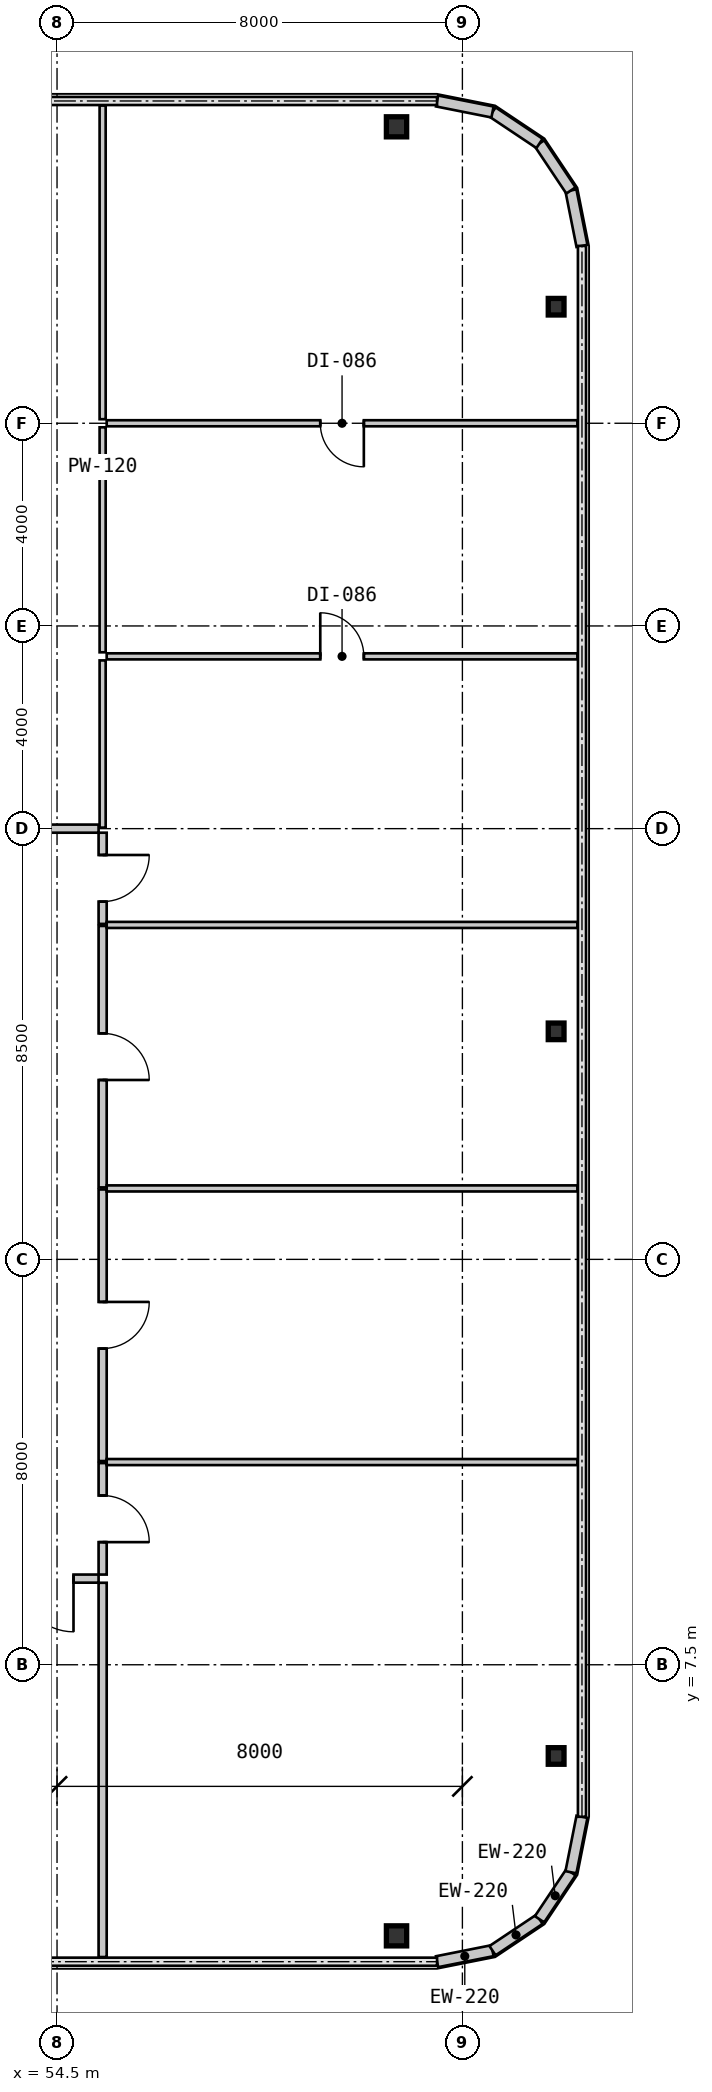
"""IFC4 building model, lengths in metres.
Left out: names, types, materials, properties, quantities, classifications, styles, units other than length and angle.
Written with IfcOpenShell. Run it as: python <this file> out.ifc"""

import sys

from ifc_helpers import new_model, si_unit, direction, frame, frame_2d, origin, origin_2d, place, context, subcontext, project, spatial, rectangle, i_section, extrude, source, transform, mapped, element, fill, save


model = new_model("IFC4")
c1 = context("Model", 3, precision=1e-05, world=origin(), true_north=direction((0.0, 1.0)))
c2 = subcontext(c1, "Body", "Model", "MODEL_VIEW")
j1 = project(units=[si_unit("LENGTHUNIT", "METRE"), si_unit("PLANEANGLEUNIT", "RADIAN")], contexts=[c1])
p1 = place(None, origin())
s1 = spatial("IfcSite", under=j1, at=p1, CompositionType="ELEMENT")
p2 = place(p1, origin())
s2 = spatial("IfcBuilding", under=s1, at=p2, CompositionType="ELEMENT")
p3 = place(p2, frame((0.0, 0.0, 51.45)))
s3 = spatial("IfcBuildingStorey", under=s2, at=p3, CompositionType="ELEMENT", Elevation=51.45)
m1 = source(origin(), c2, "Body", "SweptSolid", [
    extrude(i_section(OverallWidth=0.4, OverallDepth=0.396, WebThickness=0.022, FlangeThickness=0.034, at=origin_2d()), origin(), (0.0, 0.0, 1.0), 3.15),
])
for number, where, z_axis, x_axis in (
    (1, (61.2, 2.15, 0.0), (0.0, 0.0, 1.0), (1.0, 0.0, 0.0)),
    (2, (61.2, 37.85, 0.0), (0.0, 0.0, 1.0), (1.0, 0.0, 0.0)),
):
    element("IfcColumn", number, at=place(p3, frame(where, z_axis=z_axis, x_axis=x_axis)), inside=s3, PredefinedType="COLUMN", context=c2, shape_type="MappedRepresentation", body=[
        mapped(m1, transform((0.0, 0.0, 0.0), scale=1.0)),
    ])
m2 = source(origin(), c2, "Body", "SweptSolid", [
    extrude(i_section(OverallWidth=0.311, OverallDepth=0.327, WebThickness=0.016, FlangeThickness=0.025, at=origin_2d()), origin(), (0.0, 0.0, 1.0), 3.15),
])
for number, where, z_axis, x_axis in (
    (3, (64.35, 5.7, 0.0), (0.0, 0.0, 1.0), (1.0, 0.0, 0.0)),
    (4, (64.35, 20.0, 0.0), (0.0, 0.0, 1.0), (1.0, 0.0, 0.0)),
    (5, (64.35, 34.3, 0.0), (0.0, 0.0, 1.0), (1.0, 0.0, 0.0)),
):
    element("IfcColumn", number, at=place(p3, frame(where, z_axis=z_axis, x_axis=x_axis)), inside=s3, PredefinedType="COLUMN", context=c2, shape_type="MappedRepresentation", body=[
        mapped(m2, transform((0.0, 0.0, 0.0), scale=1.0)),
    ])
m3 = source(origin(), c2, "Body", "SweptSolid", [
    extrude(rectangle(XDim=1.116, YDim=0.22, at=frame_2d((0.558, 0.0))), origin(), (0.0, 0.0, 1.0), 2.93),
])
for number, where, z_axis, x_axis in (
    (6, (62.0, 1.64, 0.0), (0.0, 0.0, 1.0), (0.981, 0.195, 0.0)),
    (7, (63.094, 1.858, 0.0), (0.0, 0.0, 1.0), (0.831, 0.556, 0.0)),
    (8, (64.022, 2.478, 0.0), (0.0, 0.0, 1.0), (0.556, 0.831, 0.0)),
    (9, (64.642, 3.406, 0.0), (0.0, 0.0, 1.0), (0.195, 0.981, 0.0)),
    (10, (64.86, 35.5, 0.0), (0.0, 0.0, 1.0), (-0.195, 0.981, 0.0)),
    (11, (64.642, 36.594, 0.0), (0.0, 0.0, 1.0), (-0.556, 0.831, 0.0)),
    (12, (64.022, 37.522, 0.0), (0.0, 0.0, 1.0), (-0.831, 0.556, 0.0)),
    (13, (63.094, 38.142, 0.0), (0.0, 0.0, 1.0), (-0.981, 0.195, 0.0)),
):
    element("IfcWall", number, at=place(p3, frame(where, z_axis=z_axis, x_axis=x_axis)), inside=s3, PredefinedType="SOLIDWALL", context=c2, shape_type="MappedRepresentation", body=[
        mapped(m3, transform((0.0, 0.0, 0.0), scale=1.0)),
    ])
m4 = source(origin(), c2, "Body", "SweptSolid", [
    extrude(rectangle(XDim=2.04, YDim=0.16, at=frame_2d((1.02, 0.0))), origin(), (0.0, 0.0, 1.0), 2.93),
])
p4 = place(p3, frame((55.32, 9.2, 0.0), z_axis=(0.0, 0.0, 1.0), x_axis=(-1.0, 0.0, 0.0)))
e14 = element("IfcWall", 14, at=p4, inside=s3, PredefinedType="PARTITIONING", context=c2, shape_type="MappedRepresentation", body=[
    mapped(m4, transform((0.0, 0.0, 0.0), scale=1.0)),
])
m5 = source(origin(), c2, "Body", "SweptSolid", [
    extrude(rectangle(XDim=1.05, YDim=2.1, at=frame_2d((0.525, 1.05))), frame((0.0, 0.09, 0.0), z_axis=(0.0, -1.0, 0.0), x_axis=(1.0, 0.0, 0.0)), (0.0, 0.0, 1.0), 0.18),
])
p5 = place(p4, frame((0.495, 0.0, 0.0)))
e15 = element("IfcOpeningElement", 15, at=p5, cuts=e14, PredefinedType="OPENING", context=c2, shape_type="MappedRepresentation", body=[
    mapped(m5, transform((0.0, 0.0, 0.0), scale=1.0)),
])
m6 = source(origin(), c2, "Body", "SweptSolid", [
    extrude(rectangle(XDim=2.2, YDim=0.16, at=frame_2d((1.1, 0.0))), origin(), (0.0, 0.0, 1.0), 2.93),
])
p6 = place(p3, frame((55.4, 11.48, 0.0), z_axis=(0.0, 0.0, 1.0), x_axis=(0.0, -1.0, 0.0)))
e16 = element("IfcWall", 16, at=p6, inside=s3, PredefinedType="PARTITIONING", context=c2, shape_type="MappedRepresentation", body=[
    mapped(m6, transform((0.0, 0.0, 0.0), scale=1.0)),
])
m7 = source(origin(), c2, "Body", "SweptSolid", [
    extrude(rectangle(XDim=0.92, YDim=2.1, at=frame_2d((0.46, 1.05))), frame((0.0, 0.09, 0.0), z_axis=(0.0, -1.0, 0.0), x_axis=(1.0, 0.0, 0.0)), (0.0, 0.0, 1.0), 0.18),
])
p7 = place(p6, frame((0.64, 0.0, 0.0)))
e17 = element("IfcOpeningElement", 17, at=p7, cuts=e16, PredefinedType="OPENING", context=c2, shape_type="MappedRepresentation", body=[
    mapped(m7, transform((0.0, 0.0, 0.0), scale=1.0)),
])
m8 = source(origin(), c2, "Body", "SweptSolid", [
    extrude(rectangle(XDim=5.36, YDim=0.16, at=frame_2d((2.68, 0.0))), origin(), (0.0, 0.0, 1.0), 2.93),
])
p8 = place(p3, frame((55.4, 16.88, 0.0), z_axis=(0.0, 0.0, 1.0), x_axis=(0.0, -1.0, 0.0)))
e18 = element("IfcWall", 18, at=p8, inside=s3, PredefinedType="PARTITIONING", context=c2, shape_type="MappedRepresentation", body=[
    mapped(m8, transform((0.0, 0.0, 0.0), scale=1.0)),
])
p9 = place(p8, frame((2.22, 0.0, 0.0)))
e19 = element("IfcOpeningElement", 19, at=p9, cuts=e18, PredefinedType="OPENING", context=c2, shape_type="MappedRepresentation", body=[
    mapped(m7, transform((0.0, 0.0, 0.0), scale=1.0)),
])
m9 = source(origin(), c2, "Body", "SweptSolid", [
    extrude(rectangle(XDim=5.16, YDim=0.16, at=frame_2d((2.58, 0.0))), origin(), (0.0, 0.0, 1.0), 2.93),
])
p10 = place(p3, frame((55.4, 22.08, 0.0), z_axis=(0.0, 0.0, 1.0), x_axis=(0.0, -1.0, 0.0)))
e20 = element("IfcWall", 20, at=p10, inside=s3, PredefinedType="PARTITIONING", context=c2, shape_type="MappedRepresentation", body=[
    mapped(m9, transform((0.0, 0.0, 0.0), scale=1.0)),
])
p11 = place(p10, frame((2.12, 0.0, 0.0)))
e21 = element("IfcOpeningElement", 21, at=p11, cuts=e20, PredefinedType="OPENING", context=c2, shape_type="MappedRepresentation", body=[
    mapped(m7, transform((0.0, 0.0, 0.0), scale=1.0)),
])
m10 = source(origin(), c2, "Body", "SweptSolid", [
    extrude(rectangle(XDim=1.8, YDim=0.16, at=frame_2d((0.9, 0.0))), origin(), (0.0, 0.0, 1.0), 2.93),
])
p12 = place(p3, frame((55.4, 23.92, 0.0), z_axis=(0.0, 0.0, 1.0), x_axis=(0.0, -1.0, 0.0)))
e22 = element("IfcWall", 22, at=p12, inside=s3, PredefinedType="PARTITIONING", context=c2, shape_type="MappedRepresentation", body=[
    mapped(m10, transform((0.0, 0.0, 0.0), scale=1.0)),
])
p13 = place(p12, frame((0.44, 0.0, 0.0)))
e23 = element("IfcOpeningElement", 23, at=p13, cuts=e22, PredefinedType="OPENING", context=c2, shape_type="MappedRepresentation", body=[
    mapped(m7, transform((0.0, 0.0, 0.0), scale=1.0)),
])
m11 = source(origin(), c2, "Body", "SweptSolid", [
    extrude(rectangle(XDim=4.13, YDim=0.16, at=frame_2d((2.065, 0.0))), origin(), (0.0, 0.0, 1.0), 2.93),
])
p14 = place(p3, frame((51.19, 24.0, 0.0), z_axis=(0.0, 0.0, 1.0), x_axis=(1.0, 0.0, 0.0)))
e24 = element("IfcWall", 24, at=p14, inside=s3, PredefinedType="PARTITIONING", context=c2, shape_type="MappedRepresentation", body=[
    mapped(m11, transform((0.0, 0.0, 0.0), scale=1.0)),
])
m12 = source(origin(), c2, "Body", "SweptSolid", [
    extrude(rectangle(XDim=7.386, YDim=0.16, at=frame_2d((3.693, 0.0))), origin(), (0.0, 0.0, 1.0), 2.93),
])
p15 = place(p3, frame((55.4, 9.118, 0.0), z_axis=(0.0, 0.0, 1.0), x_axis=(0.0, -1.0, 0.0)))
e25 = element("IfcWall", 25, at=p15, inside=s3, PredefinedType="PARTITIONING", context=c2, shape_type="MappedRepresentation", body=[
    mapped(m12, transform((0.0, 0.0, 0.0), scale=1.0)),
])
m13 = source(origin(), c2, "Body", "SweptSolid", [
    extrude(rectangle(XDim=9.29, YDim=0.12, at=frame_2d((4.645, 0.0))), origin(), (0.0, 0.0, 1.0), 2.93),
])
for number, where, z_axis, x_axis in (
    (26, (55.48, 11.5, 0.0), (0.0, 0.0, 1.0), (1.0, 0.0, 0.0)),
    (27, (55.48, 16.9, 0.0), (0.0, 0.0, 1.0), (1.0, 0.0, 0.0)),
    (28, (55.48, 22.1, 0.0), (0.0, 0.0, 1.0), (1.0, 0.0, 0.0)),
):
    element("IfcWall", number, at=place(p3, frame(where, z_axis=z_axis, x_axis=x_axis)), inside=s3, PredefinedType="PARTITIONING", context=c2, shape_type="MappedRepresentation", body=[
        mapped(m13, transform((0.0, 0.0, 0.0), scale=1.0)),
    ])
p16 = place(p3, frame((55.48, 27.4, 0.0), z_axis=(0.0, 0.0, 1.0), x_axis=(1.0, 0.0, 0.0)))
e29 = element("IfcWall", 29, at=p16, inside=s3, PredefinedType="PARTITIONING", context=c2, shape_type="MappedRepresentation", body=[
    mapped(m13, transform((0.0, 0.0, 0.0), scale=1.0)),
])
m14 = source(origin(), c2, "Body", "SweptSolid", [
    extrude(rectangle(XDim=0.86, YDim=2.1, at=frame_2d((0.43, 1.05))), frame((0.0, 0.07, 0.0), z_axis=(0.0, -1.0, 0.0), x_axis=(1.0, 0.0, 0.0)), (0.0, 0.0, 1.0), 0.14),
])
p17 = place(p16, frame((4.215, 0.0, 0.0)))
e30 = element("IfcOpeningElement", 30, at=p17, cuts=e29, PredefinedType="OPENING", context=c2, shape_type="MappedRepresentation", body=[
    mapped(m14, transform((0.0, 0.0, 0.0), scale=1.0)),
])
m15 = source(origin(), c2, "Body", "SweptSolid", [
    extrude(rectangle(XDim=3.3, YDim=0.12, at=frame_2d((1.65, 0.0))), origin(), (0.0, 0.0, 1.0), 2.93),
])
p18 = place(p3, frame((55.4, 24.02, 0.0), z_axis=(0.0, 0.0, 1.0), x_axis=(0.0, 1.0, 0.0)))
e31 = element("IfcWall", 31, at=p18, inside=s3, PredefinedType="PARTITIONING", context=c2, shape_type="MappedRepresentation", body=[
    mapped(m15, transform((0.0, 0.0, 0.0), scale=1.0)),
])
p19 = place(p3, frame((55.48, 32.0, 0.0), z_axis=(0.0, 0.0, 1.0), x_axis=(1.0, 0.0, 0.0)))
e32 = element("IfcWall", 32, at=p19, inside=s3, PredefinedType="PARTITIONING", context=c2, shape_type="MappedRepresentation", body=[
    mapped(m13, transform((0.0, 0.0, 0.0), scale=1.0)),
])
p20 = place(p19, frame((4.215, 0.0, 0.0)))
e33 = element("IfcOpeningElement", 33, at=p20, cuts=e32, PredefinedType="OPENING", context=c2, shape_type="MappedRepresentation", body=[
    mapped(m14, transform((0.0, 0.0, 0.0), scale=1.0)),
])
m16 = source(origin(), c2, "Body", "SweptSolid", [
    extrude(rectangle(XDim=4.44, YDim=0.12, at=frame_2d((2.22, 0.0))), origin(), (0.0, 0.0, 1.0), 2.93),
])
p21 = place(p3, frame((55.4, 27.48, 0.0), z_axis=(0.0, 0.0, 1.0), x_axis=(0.0, 1.0, 0.0)))
e34 = element("IfcWall", 34, at=p21, inside=s3, PredefinedType="PARTITIONING", context=c2, shape_type="MappedRepresentation", body=[
    mapped(m16, transform((0.0, 0.0, 0.0), scale=1.0)),
])
m17 = source(origin(), c2, "Body", "SweptSolid", [
    extrude(rectangle(XDim=6.19, YDim=0.12, at=frame_2d((3.095, 0.0))), origin(), (0.0, 0.0, 1.0), 2.93),
])
p22 = place(p3, frame((55.4, 32.08, 0.0), z_axis=(0.0, 0.0, 1.0), x_axis=(0.0, 1.0, 0.0)))
e35 = element("IfcWall", 35, at=p22, inside=s3, PredefinedType="PARTITIONING", context=c2, shape_type="MappedRepresentation", body=[
    mapped(m17, transform((0.0, 0.0, 0.0), scale=1.0)),
])
m18 = source(origin(), c2, "Body", "SweptSolid", [
    extrude(rectangle(XDim=1.05, YDim=2.1, at=frame_2d((0.525, 1.05))), frame((0.0, 0.025, 0.0), z_axis=(0.0, -1.0, 0.0), x_axis=(1.0, 0.0, 0.0)), (0.0, 0.0, 1.0), 0.05),
])
p23 = place(p5, origin())
e36 = element("IfcDoor", 36, at=p23, inside=s3, OperationType="SINGLE_SWING_LEFT", PredefinedType="DOOR", context=c2, shape_type="MappedRepresentation", body=[
    mapped(m18, transform((0.0, 0.0, 0.0), scale=1.0)),
])
fill(e15, e36)
m19 = source(origin(), c2, "Body", "SweptSolid", [
    extrude(rectangle(XDim=0.92, YDim=2.1, at=frame_2d((0.46, 1.05))), frame((0.0, 0.025, 0.0), z_axis=(0.0, -1.0, 0.0), x_axis=(1.0, 0.0, 0.0)), (0.0, 0.0, 1.0), 0.05),
])
p24 = place(p7, origin())
e37 = element("IfcDoor", 37, at=p24, inside=s3, OperationType="SINGLE_SWING_RIGHT", PredefinedType="DOOR", context=c2, shape_type="MappedRepresentation", body=[
    mapped(m19, transform((0.0, 0.0, 0.0), scale=1.0)),
])
fill(e17, e37)
p25 = place(p9, origin())
e38 = element("IfcDoor", 38, at=p25, inside=s3, OperationType="SINGLE_SWING_LEFT", PredefinedType="DOOR", context=c2, shape_type="MappedRepresentation", body=[
    mapped(m19, transform((0.0, 0.0, 0.0), scale=1.0)),
])
fill(e19, e38)
p26 = place(p11, origin())
e39 = element("IfcDoor", 39, at=p26, inside=s3, OperationType="SINGLE_SWING_RIGHT", PredefinedType="DOOR", context=c2, shape_type="MappedRepresentation", body=[
    mapped(m19, transform((0.0, 0.0, 0.0), scale=1.0)),
])
fill(e21, e39)
p27 = place(p13, origin())
e40 = element("IfcDoor", 40, at=p27, inside=s3, OperationType="SINGLE_SWING_LEFT", PredefinedType="DOOR", context=c2, shape_type="MappedRepresentation", body=[
    mapped(m19, transform((0.0, 0.0, 0.0), scale=1.0)),
])
fill(e23, e40)
m20 = source(origin(), c2, "Body", "SweptSolid", [
    extrude(rectangle(XDim=0.86, YDim=2.1, at=frame_2d((0.43, 1.05))), frame((0.0, 0.025, 0.0), z_axis=(0.0, -1.0, 0.0), x_axis=(1.0, 0.0, 0.0)), (0.0, 0.0, 1.0), 0.05),
])
p28 = place(p17, origin())
e41 = element("IfcDoor", 41, at=p28, inside=s3, OperationType="SINGLE_SWING_LEFT", PredefinedType="DOOR", context=c2, shape_type="MappedRepresentation", body=[
    mapped(m20, transform((0.0, 0.0, 0.0), scale=1.0)),
])
fill(e30, e41)
p29 = place(p20, frame((0.86, 0.0, 0.0), z_axis=(0.0, 0.0, 1.0), x_axis=(-1.0, 0.0, 0.0)))
e42 = element("IfcDoor", 42, at=p29, inside=s3, OperationType="SINGLE_SWING_LEFT", PredefinedType="DOOR", context=c2, shape_type="MappedRepresentation", body=[
    mapped(m20, transform((0.0, 0.0, 0.0), scale=1.0)),
])
fill(e33, e42)
save(model, sys.argv[1])
